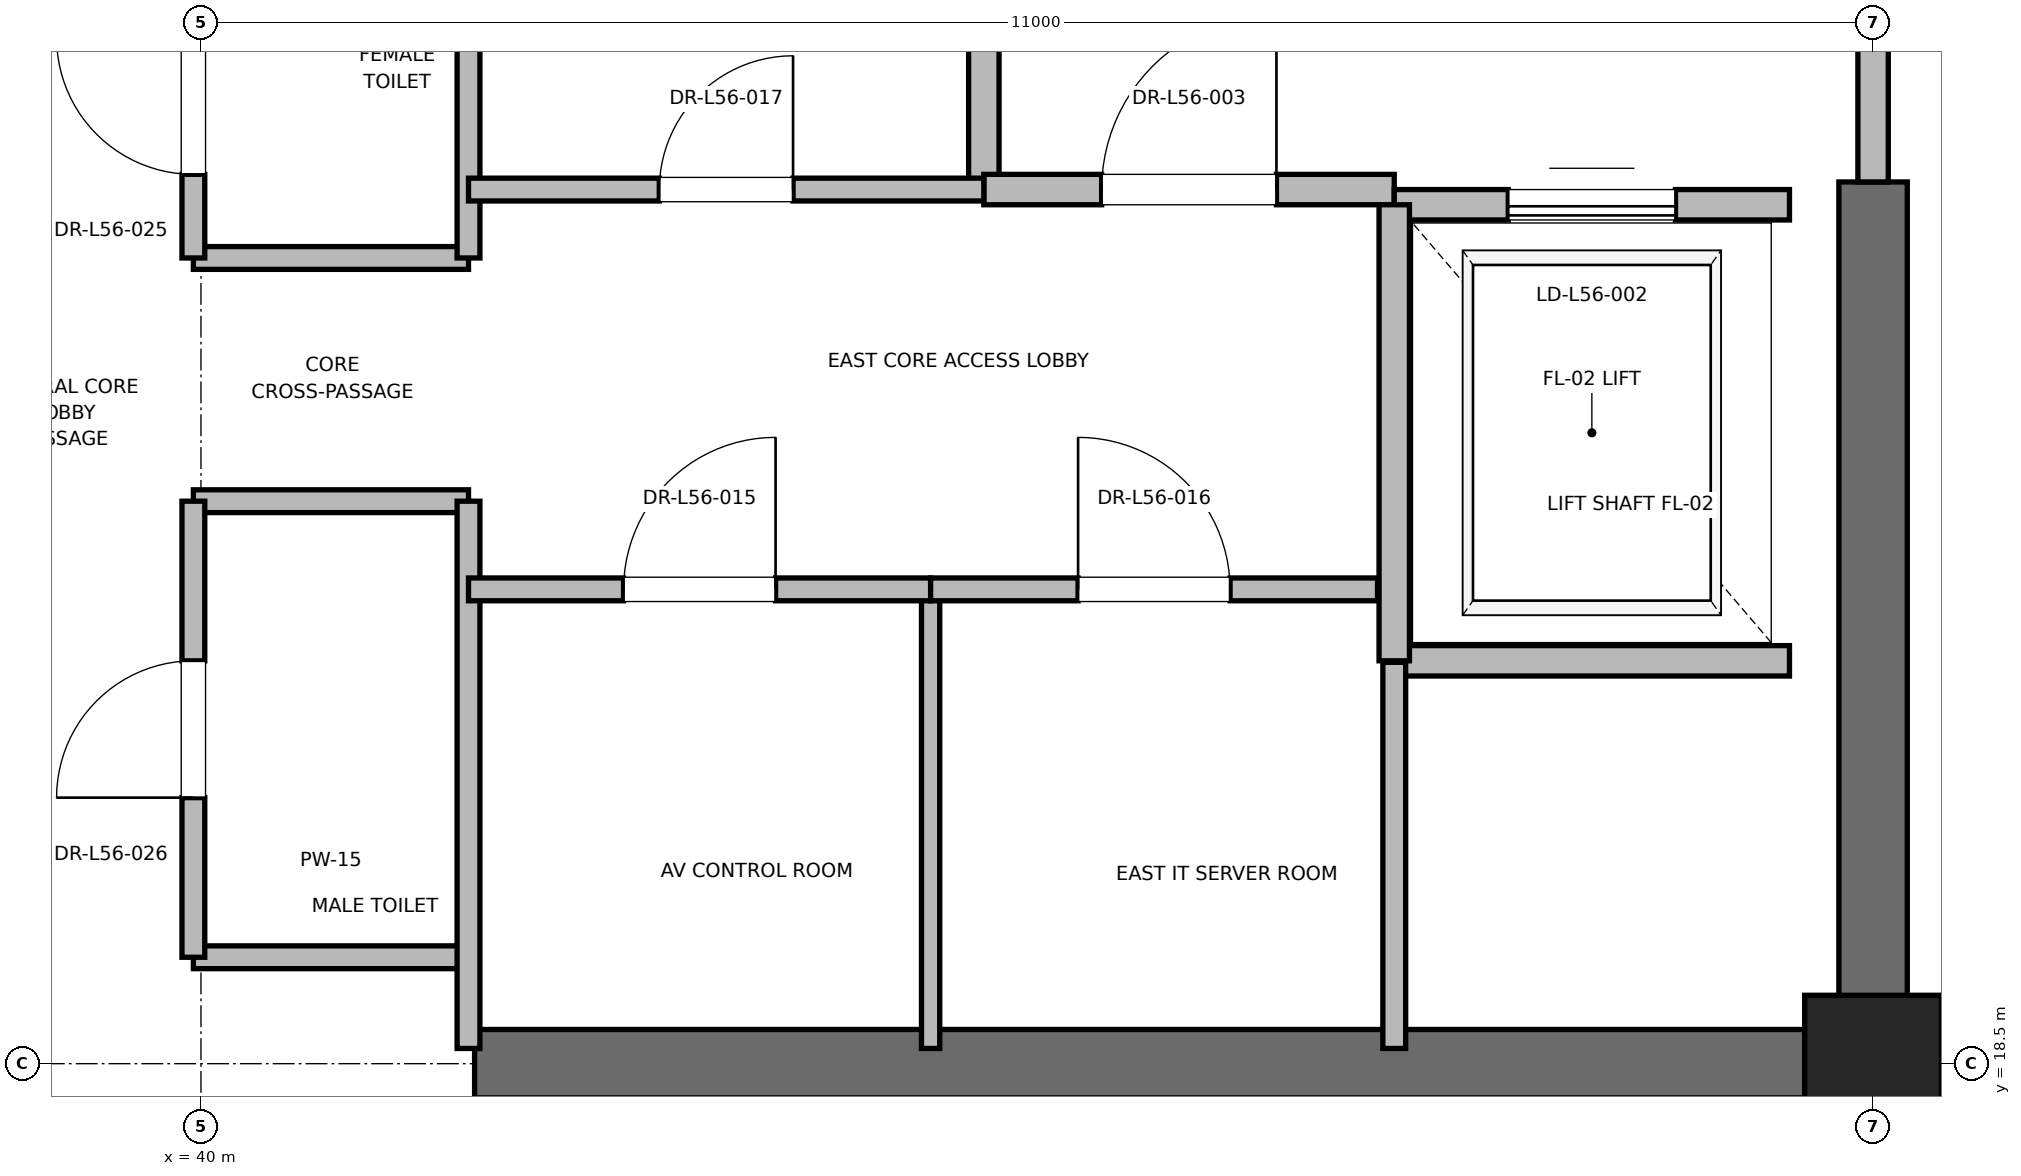
"""IFC4 building model, lengths in metres.
Left out: names, types, materials, properties, quantities, classifications, styles, units other than length and angle.
Written with IfcOpenShell. Run it as: python <this file> out.ifc"""

import sys

from ifc_helpers import new_model, si_unit, direction, frame, frame_2d, origin, origin_2d, place, context, subcontext, project, spatial, rectangle, extrude, element, fill, save


model = new_model("IFC4")
c1 = context("Model", 3, precision=1e-05, world=origin(), true_north=direction((0.0, 1.0)))
c2 = subcontext(c1, "Body", "Model", "MODEL_VIEW")
j1 = project(units=[si_unit("LENGTHUNIT", "METRE"), si_unit("PLANEANGLEUNIT", "RADIAN")], contexts=[c1])
p1 = place(None, origin())
s1 = spatial("IfcSite", under=j1, at=p1, CompositionType="ELEMENT")
p2 = place(p1, origin())
s2 = spatial("IfcBuilding", under=s1, at=p2, CompositionType="ELEMENT")
p3 = place(p2, frame((0.0, 0.0, 243.2)))
s3 = spatial("IfcBuildingStorey", under=s2, at=p3, CompositionType="ELEMENT", Elevation=243.2)
p4 = place(p3, frame((51.0, 18.5, 0.0), z_axis=(0.0, 0.0, 1.0), x_axis=(1.0, 0.0, 0.0)))
e1 = element("IfcColumn", 1, at=p4, inside=s3, PredefinedType="PILASTER", context=c2, shape_type="SweptSolid", body=[
    extrude(rectangle(XDim=0.9, YDim=0.9, at=origin_2d()), origin(), (0.0, 0.0, 1.0), 4.0),
])
p5 = place(p3, frame((41.8, 18.5, 0.0), z_axis=(0.0, 0.0, 1.0), x_axis=(1.0, 0.0, 0.0)))
e2 = element("IfcWall", 2, at=p5, inside=s3, PredefinedType="SHEAR", context=c2, shape_type="SweptSolid", body=[
    extrude(rectangle(XDim=9.2, YDim=0.45, at=frame_2d((4.6, 0.0))), origin(), (0.0, 0.0, 1.0), 3.785),
])
p6 = place(p3, frame((51.0, 18.5, 0.0), z_axis=(0.0, 0.0, 1.0), x_axis=(0.0, 1.0, 0.0)))
e3 = element("IfcWall", 3, at=p6, inside=s3, PredefinedType="SHEAR", context=c2, shape_type="SweptSolid", body=[
    extrude(rectangle(XDim=5.8, YDim=0.45, at=frame_2d((2.9, 0.0))), origin(), (0.0, 0.0, 1.0), 3.785),
])
p7 = place(p3, frame((45.15, 24.25, 0.0), z_axis=(0.0, 0.0, 1.0), x_axis=(0.0, 1.0, 0.0)))
e4 = element("IfcWall", 4, at=p7, inside=s3, PredefinedType="PARTITIONING", context=c2, shape_type="SweptSolid", body=[
    extrude(rectangle(XDim=3.37, YDim=0.2, at=frame_2d((1.685, 0.0))), origin(), (0.0, 0.0, 1.0), 3.785),
])
p8 = place(p3, frame((45.15, 24.25, 0.0), z_axis=(0.0, 0.0, 1.0), x_axis=(1.0, 0.0, 0.0)))
e5 = element("IfcWall", 5, at=p8, inside=s3, PredefinedType="PARTITIONING", context=c2, shape_type="SweptSolid", body=[
    extrude(rectangle(XDim=2.7, YDim=0.2, at=frame_2d((1.35, 0.0))), origin(), (0.0, 0.0, 1.0), 3.785),
])
p9 = place(p8, frame((0.775, 0.0, 0.0)))
e6 = element("IfcOpeningElement", 6, at=p9, cuts=e5, PredefinedType="OPENING", context=c2, shape_type="SweptSolid", body=[
    extrude(rectangle(XDim=1.15, YDim=2.2, at=frame_2d((0.575, 1.1))), frame((0.0, 0.1, 0.0), z_axis=(0.0, -1.0, 0.0), x_axis=(1.0, 0.0, 0.0)), (0.0, 0.0, 1.0), 0.2),
])
p10 = place(p3, frame((51.0, 24.3, 0.0), z_axis=(0.0, 0.0, 1.0), x_axis=(0.0, 1.0, 0.0)))
e7 = element("IfcWall", 7, at=p10, inside=s3, PredefinedType="PARTITIONING", context=c2, shape_type="SweptSolid", body=[
    extrude(rectangle(XDim=3.4, YDim=0.2, at=frame_2d((1.7, 0.0))), origin(), (0.0, 0.0, 1.0), 2.865),
])
p11 = place(p10, frame((1.125, 0.0, 0.0)))
e8 = element("IfcOpeningElement", 8, at=p11, cuts=e7, PredefinedType="OPENING", context=c2, shape_type="SweptSolid", body=[
    extrude(rectangle(XDim=1.15, YDim=2.2, at=frame_2d((0.575, 1.1))), frame((0.0, 0.1, 0.0), z_axis=(0.0, -1.0, 0.0), x_axis=(1.0, 0.0, 0.0)), (0.0, 0.0, 1.0), 0.2),
])
p12 = place(p3, frame((47.85, 21.15, 0.0), z_axis=(0.0, 0.0, 1.0), x_axis=(1.0, 0.0, 0.0)))
e9 = element("IfcWall", 9, at=p12, inside=s3, PredefinedType="SOLIDWALL", context=c2, shape_type="SweptSolid", body=[
    extrude(rectangle(XDim=2.6, YDim=0.2, at=frame_2d((1.3, 0.0))), origin(), (0.0, 0.0, 1.0), 3.785),
])
p13 = place(p3, frame((50.45, 24.15, 0.0), z_axis=(0.0, 0.0, 1.0), x_axis=(-1.0, 0.0, 0.0)))
e10 = element("IfcWall", 10, at=p13, inside=s3, PredefinedType="SOLIDWALL", context=c2, shape_type="SweptSolid", body=[
    extrude(rectangle(XDim=2.6, YDim=0.2, at=frame_2d((1.3, 0.0))), origin(), (0.0, 0.0, 1.0), 2.865),
])
p14 = place(p13, frame((0.75, 0.0, 0.0)))
e11 = element("IfcOpeningElement", 11, at=p14, cuts=e10, PredefinedType="OPENING", context=c2, shape_type="SweptSolid", body=[
    extrude(rectangle(XDim=1.1, YDim=2.2, at=frame_2d((0.55, 1.1))), frame((0.0, 0.1, 0.0), z_axis=(0.0, -1.0, 0.0), x_axis=(1.0, 0.0, 0.0)), (0.0, 0.0, 1.0), 0.2),
])
p15 = place(p3, frame((47.85, 24.15, 0.0), z_axis=(0.0, 0.0, 1.0), x_axis=(0.0, -1.0, 0.0)))
e12 = element("IfcWall", 12, at=p15, inside=s3, PredefinedType="SOLIDWALL", context=c2, shape_type="SweptSolid", body=[
    extrude(rectangle(XDim=3.0, YDim=0.2, at=frame_2d((1.5, 0.0))), origin(), (0.0, 0.0, 1.0), 3.785),
])
for number, where, z_axis, x_axis in (
    (13, (39.95, 19.2, 0.0), (0.0, 0.0, 1.0), (1.0, 0.0, 0.0)),
    (14, (39.95, 22.2, 0.0), (0.0, 0.0, 1.0), (1.0, 0.0, 0.0)),
    (15, (39.95, 23.8, 0.0), (0.0, 0.0, 1.0), (1.0, 0.0, 0.0)),
):
    element("IfcWall", number, at=place(p3, frame(where, z_axis=z_axis, x_axis=x_axis)), inside=s3, PredefinedType="PARTITIONING", context=c2, shape_type="SweptSolid", body=[
        extrude(rectangle(XDim=1.81, YDim=0.15, at=frame_2d((0.905, 0.0))), origin(), (0.0, 0.0, 1.0), 2.85),
    ])
p16 = place(p3, frame((41.76, 18.6, 0.0), z_axis=(0.0, 0.0, 1.0), x_axis=(0.0, 1.0, 0.0)))
e16 = element("IfcWall", 16, at=p16, inside=s3, PredefinedType="PARTITIONING", context=c2, shape_type="SweptSolid", body=[
    extrude(rectangle(XDim=3.6, YDim=0.15, at=frame_2d((1.8, 0.0))), origin(), (0.0, 0.0, 1.0), 2.85),
])
p17 = place(p3, frame((41.76, 23.8, 0.0), z_axis=(0.0, 0.0, 1.0), x_axis=(0.0, 1.0, 0.0)))
e17 = element("IfcWall", 17, at=p17, inside=s3, PredefinedType="PARTITIONING", context=c2, shape_type="SweptSolid", body=[
    extrude(rectangle(XDim=4.0, YDim=0.15, at=frame_2d((2.0, 0.0))), origin(), (0.0, 0.0, 1.0), 2.85),
])
p18 = place(p3, frame((39.95, 19.2, 0.0), z_axis=(0.0, 0.0, 1.0), x_axis=(0.0, 1.0, 0.0)))
e18 = element("IfcWall", 18, at=p18, inside=s3, PredefinedType="PARTITIONING", context=c2, shape_type="SweptSolid", body=[
    extrude(rectangle(XDim=3.0, YDim=0.15, at=frame_2d((1.5, 0.0))), origin(), (0.0, 0.0, 1.0), 2.85),
])
p19 = place(p18, frame((1.05, 0.0, 0.0)))
e19 = element("IfcOpeningElement", 19, at=p19, cuts=e18, PredefinedType="OPENING", context=c2, shape_type="SweptSolid", body=[
    extrude(rectangle(XDim=0.9, YDim=2.1, at=frame_2d((0.45, 1.05))), frame((0.0, 0.075, 0.0), z_axis=(0.0, -1.0, 0.0), x_axis=(1.0, 0.0, 0.0)), (0.0, 0.0, 1.0), 0.15),
])
p20 = place(p3, frame((39.95, 23.8, 0.0), z_axis=(0.0, 0.0, 1.0), x_axis=(0.0, 1.0, 0.0)))
e20 = element("IfcWall", 20, at=p20, inside=s3, PredefinedType="PARTITIONING", context=c2, shape_type="SweptSolid", body=[
    extrude(rectangle(XDim=2.0, YDim=0.15, at=frame_2d((1.0, 0.0))), origin(), (0.0, 0.0, 1.0), 2.85),
])
p21 = place(p20, frame((0.55, 0.0, 0.0)))
e21 = element("IfcOpeningElement", 21, at=p21, cuts=e20, PredefinedType="OPENING", context=c2, shape_type="SweptSolid", body=[
    extrude(rectangle(XDim=0.9, YDim=2.1, at=frame_2d((0.45, 1.05))), frame((0.0, 0.075, 0.0), z_axis=(0.0, -1.0, 0.0), x_axis=(1.0, 0.0, 0.0)), (0.0, 0.0, 1.0), 0.15),
])
p22 = place(p3, frame((47.85, 18.6, 0.0), z_axis=(0.0, 0.0, 1.0), x_axis=(0.0, 1.0, 0.0)))
e22 = element("IfcWall", 22, at=p22, inside=s3, PredefinedType="PARTITIONING", context=c2, shape_type="SweptSolid", body=[
    extrude(rectangle(XDim=2.54, YDim=0.15, at=frame_2d((1.27, 0.0))), origin(), (0.0, 0.0, 1.0), 2.85),
])
p23 = place(p3, frame((44.8, 18.6, 0.0), z_axis=(0.0, 0.0, 1.0), x_axis=(0.0, 1.0, 0.0)))
e23 = element("IfcWall", 23, at=p23, inside=s3, PredefinedType="PARTITIONING", context=c2, shape_type="SweptSolid", body=[
    extrude(rectangle(XDim=3.02, YDim=0.12, at=frame_2d((1.51, 0.0))), origin(), (0.0, 0.0, 1.0), 2.85),
])
p24 = place(p3, frame((41.76, 21.62, 0.0), z_axis=(0.0, 0.0, 1.0), x_axis=(1.0, 0.0, 0.0)))
e24 = element("IfcWall", 24, at=p24, inside=s3, PredefinedType="PARTITIONING", context=c2, shape_type="SweptSolid", body=[
    extrude(rectangle(XDim=3.04, YDim=0.15, at=frame_2d((1.52, 0.0))), origin(), (0.0, 0.0, 1.0), 2.85),
])
p25 = place(p24, frame((1.02, 0.0, 0.0)))
e25 = element("IfcOpeningElement", 25, at=p25, cuts=e24, PredefinedType="OPENING", context=c2, shape_type="SweptSolid", body=[
    extrude(rectangle(XDim=1.0, YDim=2.15, at=frame_2d((0.5, 1.075))), frame((0.0, 0.075, 0.0), z_axis=(0.0, -1.0, 0.0), x_axis=(1.0, 0.0, 0.0)), (0.0, 0.0, 1.0), 0.15),
])
p26 = place(p3, frame((44.8, 21.62, 0.0), z_axis=(0.0, 0.0, 1.0), x_axis=(1.0, 0.0, 0.0)))
e26 = element("IfcWall", 26, at=p26, inside=s3, PredefinedType="PARTITIONING", context=c2, shape_type="SweptSolid", body=[
    extrude(rectangle(XDim=2.94, YDim=0.15, at=frame_2d((1.47, 0.0))), origin(), (0.0, 0.0, 1.0), 2.85),
])
p27 = place(p26, frame((0.97, 0.0, 0.0)))
e27 = element("IfcOpeningElement", 27, at=p27, cuts=e26, PredefinedType="OPENING", context=c2, shape_type="SweptSolid", body=[
    extrude(rectangle(XDim=1.0, YDim=2.15, at=frame_2d((0.5, 1.075))), frame((0.0, 0.075, 0.0), z_axis=(0.0, -1.0, 0.0), x_axis=(1.0, 0.0, 0.0)), (0.0, 0.0, 1.0), 0.15),
])
p28 = place(p3, frame((41.76, 24.25, 0.0), z_axis=(0.0, 0.0, 1.0), x_axis=(1.0, 0.0, 0.0)))
e28 = element("IfcWall", 28, at=p28, inside=s3, PredefinedType="PARTITIONING", context=c2, shape_type="SweptSolid", body=[
    extrude(rectangle(XDim=3.39, YDim=0.15, at=frame_2d((1.695, 0.0))), origin(), (0.0, 0.0, 1.0), 2.85),
])
p29 = place(p28, frame((1.255, 0.0, 0.0)))
e29 = element("IfcOpeningElement", 29, at=p29, cuts=e28, PredefinedType="OPENING", context=c2, shape_type="SweptSolid", body=[
    extrude(rectangle(XDim=0.88, YDim=2.1, at=frame_2d((0.44, 1.05))), frame((0.0, 0.075, 0.0), z_axis=(0.0, -1.0, 0.0), x_axis=(1.0, 0.0, 0.0)), (0.0, 0.0, 1.0), 0.15),
])
p30 = place(p9, origin())
e30 = element("IfcDoor", 30, at=p30, inside=s3, OperationType="SINGLE_SWING_RIGHT", PredefinedType="DOOR", context=c2, shape_type="SweptSolid", body=[
    extrude(rectangle(XDim=1.15, YDim=2.2, at=frame_2d((0.575, 1.1))), frame((0.0, 0.025, 0.0), z_axis=(0.0, -1.0, 0.0), x_axis=(1.0, 0.0, 0.0)), (0.0, 0.0, 1.0), 0.05),
])
fill(e6, e30)
p31 = place(p14, origin())
e31 = element("IfcDoor", 31, at=p31, inside=s3, OperationType="SLIDING_TO_RIGHT", PredefinedType="DOOR", context=c2, shape_type="SweptSolid", body=[
    extrude(rectangle(XDim=1.1, YDim=2.2, at=frame_2d((0.55, 1.1))), frame((0.0, 0.025, 0.0), z_axis=(0.0, -1.0, 0.0), x_axis=(1.0, 0.0, 0.0)), (0.0, 0.0, 1.0), 0.05),
])
fill(e11, e31)
p32 = place(p19, origin())
e32 = element("IfcDoor", 32, at=p32, inside=s3, OperationType="SINGLE_SWING_LEFT", PredefinedType="DOOR", context=c2, shape_type="SweptSolid", body=[
    extrude(rectangle(XDim=0.9, YDim=2.1, at=frame_2d((0.45, 1.05))), frame((0.0, 0.025, 0.0), z_axis=(0.0, -1.0, 0.0), x_axis=(1.0, 0.0, 0.0)), (0.0, 0.0, 1.0), 0.05),
])
fill(e19, e32)
p33 = place(p21, origin())
e33 = element("IfcDoor", 33, at=p33, inside=s3, OperationType="SINGLE_SWING_RIGHT", PredefinedType="DOOR", context=c2, shape_type="SweptSolid", body=[
    extrude(rectangle(XDim=0.9, YDim=2.1, at=frame_2d((0.45, 1.05))), frame((0.0, 0.025, 0.0), z_axis=(0.0, -1.0, 0.0), x_axis=(1.0, 0.0, 0.0)), (0.0, 0.0, 1.0), 0.05),
])
fill(e21, e33)
p34 = place(p25, origin())
e34 = element("IfcDoor", 34, at=p34, inside=s3, OperationType="SINGLE_SWING_RIGHT", PredefinedType="DOOR", context=c2, shape_type="SweptSolid", body=[
    extrude(rectangle(XDim=1.0, YDim=2.15, at=frame_2d((0.5, 1.075))), frame((0.0, 0.025, 0.0), z_axis=(0.0, -1.0, 0.0), x_axis=(1.0, 0.0, 0.0)), (0.0, 0.0, 1.0), 0.05),
])
fill(e25, e34)
p35 = place(p27, origin())
e35 = element("IfcDoor", 35, at=p35, inside=s3, OperationType="SINGLE_SWING_LEFT", PredefinedType="DOOR", context=c2, shape_type="SweptSolid", body=[
    extrude(rectangle(XDim=1.0, YDim=2.15, at=frame_2d((0.5, 1.075))), frame((0.0, 0.025, 0.0), z_axis=(0.0, -1.0, 0.0), x_axis=(1.0, 0.0, 0.0)), (0.0, 0.0, 1.0), 0.05),
])
fill(e27, e35)
p36 = place(p29, origin())
e36 = element("IfcDoor", 36, at=p36, inside=s3, OperationType="SINGLE_SWING_RIGHT", PredefinedType="DOOR", context=c2, shape_type="SweptSolid", body=[
    extrude(rectangle(XDim=0.88, YDim=2.1, at=frame_2d((0.44, 1.05))), frame((0.0, 0.025, 0.0), z_axis=(0.0, -1.0, 0.0), x_axis=(1.0, 0.0, 0.0)), (0.0, 0.0, 1.0), 0.05),
])
fill(e29, e36)
save(model, sys.argv[1])
